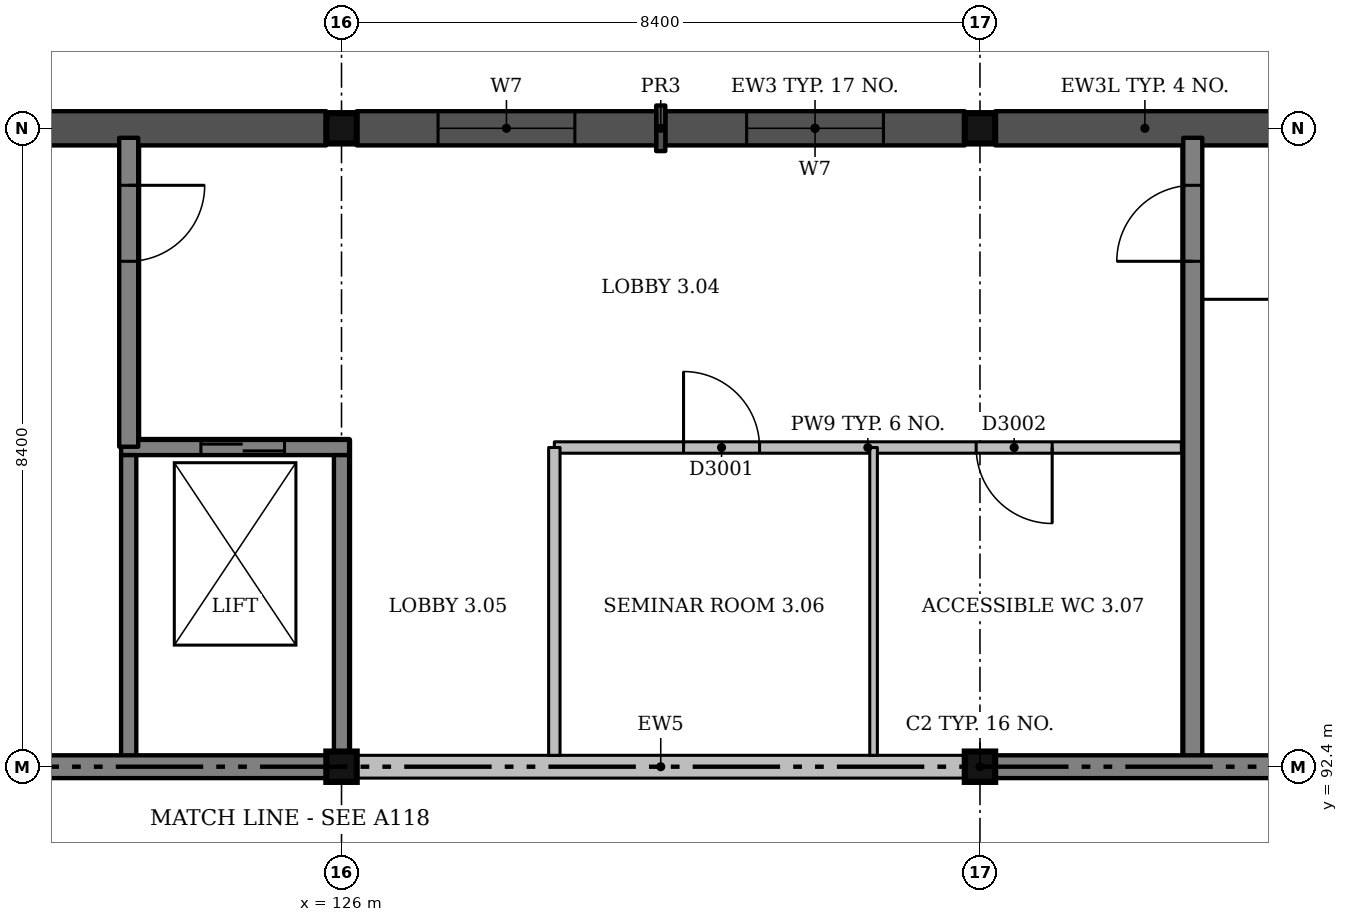
"""IFC4 building model, lengths in metres.
Left out: names, types, materials, properties, quantities, classifications, styles, units other than length and angle.
Written with IfcOpenShell. Run it as: python <this file> out.ifc"""

import sys

from ifc_helpers import new_model, si_unit, direction, frame, frame_2d, origin, origin_2d, place, context, subcontext, project, spatial, rectangle, extrude, element, fill, save


model = new_model("IFC4")
c1 = context("Model", 3, precision=1e-05, world=origin(), true_north=direction((0.0, 1.0)))
c2 = subcontext(c1, "Body", "Model", "MODEL_VIEW")
j1 = project(units=[si_unit("LENGTHUNIT", "METRE"), si_unit("PLANEANGLEUNIT", "RADIAN")], contexts=[c1])
p1 = place(None, origin())
s1 = spatial("IfcSite", under=j1, at=p1, CompositionType="ELEMENT")
p2 = place(p1, origin())
s2 = spatial("IfcBuilding", under=s1, at=p2, CompositionType="ELEMENT")
p3 = place(p2, frame((0.0, 0.0, 13.5)))
s3 = spatial("IfcBuildingStorey", under=s2, at=p3, CompositionType="ELEMENT", Elevation=13.5)
for number, where, z_axis, x_axis in (
    (1, (126.0, 92.4, 0.0), (0.0, 0.0, 1.0), (1.0, 0.0, 0.0)),
    (2, (126.0, 100.8, 0.0), (0.0, 0.0, 1.0), (1.0, 0.0, 0.0)),
    (3, (134.4, 92.4, 0.0), (0.0, 0.0, 1.0), (1.0, 0.0, 0.0)),
    (4, (134.4, 100.8, 0.0), (0.0, 0.0, 1.0), (1.0, 0.0, 0.0)),
):
    element("IfcColumn", number, at=place(p3, frame(where, z_axis=z_axis, x_axis=x_axis)), inside=s3, PredefinedType="COLUMN", context=c2, shape_type="SweptSolid", body=[
        extrude(rectangle(XDim=0.4, YDim=0.4, at=origin_2d()), origin(), (0.0, 0.0, 1.0), 4.5),
    ])
p4 = place(p3, frame((123.1, 96.6, 0.0), z_axis=(0.0, 0.0, 1.0), x_axis=(1.0, 0.0, 0.0)))
e5 = element("IfcWall", 5, at=p4, inside=s3, PredefinedType="SHEAR", context=c2, shape_type="SweptSolid", body=[
    extrude(rectangle(XDim=3.0, YDim=0.2, at=frame_2d((1.5, 0.0))), origin(), (0.0, 0.0, 1.0), 4.5),
])
p5 = place(p4, frame((1.05, 0.0, 0.0)))
e6 = element("IfcOpeningElement", 6, at=p5, cuts=e5, PredefinedType="OPENING", context=c2, shape_type="SweptSolid", body=[
    extrude(rectangle(XDim=1.1, YDim=2.1, at=frame_2d((0.55, 1.05))), frame((0.0, 0.11, 0.0), z_axis=(0.0, -1.0, 0.0), x_axis=(1.0, 0.0, 0.0)), (0.0, 0.0, 1.0), 0.22),
])
p6 = place(p3, frame((123.2, 92.5, 0.0), z_axis=(0.0, 0.0, 1.0), x_axis=(0.0, 1.0, 0.0)))
e7 = element("IfcWall", 7, at=p6, inside=s3, PredefinedType="SHEAR", context=c2, shape_type="SweptSolid", body=[
    extrude(rectangle(XDim=4.0, YDim=0.2, at=frame_2d((2.0, 0.0))), origin(), (0.0, 0.0, 1.0), 4.5),
])
p7 = place(p3, frame((126.0, 92.6, 0.0), z_axis=(0.0, 0.0, 1.0), x_axis=(0.0, 1.0, 0.0)))
e8 = element("IfcWall", 8, at=p7, inside=s3, PredefinedType="SHEAR", context=c2, shape_type="SweptSolid", body=[
    extrude(rectangle(XDim=3.9, YDim=0.2, at=frame_2d((1.95, 0.0))), origin(), (0.0, 0.0, 1.0), 4.5),
])
p8 = place(p3, frame((123.2, 96.61, 0.0), z_axis=(0.0, 0.0, 1.0), x_axis=(0.0, 1.0, 0.0)))
e9 = element("IfcWall", 9, at=p8, inside=s3, PredefinedType="SHEAR", context=c2, shape_type="SweptSolid", body=[
    extrude(rectangle(XDim=4.065, YDim=0.25, at=frame_2d((2.032, 0.0))), origin(), (0.0, 0.0, 1.0), 4.5),
])
p9 = place(p8, frame((2.44, 0.0, 0.0)))
e10 = element("IfcOpeningElement", 10, at=p9, cuts=e9, PredefinedType="OPENING", context=c2, shape_type="SweptSolid", body=[
    extrude(rectangle(XDim=1.0, YDim=2.1, at=frame_2d((0.5, 1.05))), frame((0.0, 0.135, 0.0), z_axis=(0.0, -1.0, 0.0), x_axis=(1.0, 0.0, 0.0)), (0.0, 0.0, 1.0), 0.27),
])
p10 = place(p3, frame((137.2, 92.525, 0.0), z_axis=(0.0, 0.0, 1.0), x_axis=(0.0, 1.0, 0.0)))
e11 = element("IfcWall", 11, at=p10, inside=s3, PredefinedType="SHEAR", context=c2, shape_type="SweptSolid", body=[
    extrude(rectangle(XDim=8.15, YDim=0.25, at=frame_2d((4.075, 0.0))), origin(), (0.0, 0.0, 1.0), 4.5),
])
p11 = place(p10, frame((6.525, 0.0, 0.0)))
e12 = element("IfcOpeningElement", 12, at=p11, cuts=e11, PredefinedType="OPENING", context=c2, shape_type="SweptSolid", body=[
    extrude(rectangle(XDim=1.0, YDim=2.1, at=frame_2d((0.5, 1.05))), frame((0.0, 0.135, 0.0), z_axis=(0.0, -1.0, 0.0), x_axis=(1.0, 0.0, 0.0)), (0.0, 0.0, 1.0), 0.27),
])
p12 = place(p3, frame((138.54, 100.8, 0.0), z_axis=(0.0, 0.0, 1.0), x_axis=(-1.0, 0.0, 0.0)))
e13 = element("IfcWall", 13, at=p12, inside=s3, PredefinedType="SOLIDWALL", context=c2, shape_type="SweptSolid", body=[
    extrude(rectangle(XDim=3.94, YDim=0.45, at=frame_2d((1.97, 0.0))), origin(), (0.0, 0.0, 1.0), 4.5),
])
p13 = place(p3, frame((134.2, 100.8, 0.0), z_axis=(0.0, 0.0, 1.0), x_axis=(-1.0, 0.0, 0.0)))
e14 = element("IfcWall", 14, at=p13, inside=s3, PredefinedType="SOLIDWALL", context=c2, shape_type="SweptSolid", body=[
    extrude(rectangle(XDim=3.94, YDim=0.45, at=frame_2d((1.97, 0.0))), origin(), (0.0, 0.0, 1.0), 4.5),
])
p14 = place(p13, frame((1.07, 0.0, 0.9)))
e15 = element("IfcOpeningElement", 15, at=p14, cuts=e14, PredefinedType="OPENING", context=c2, shape_type="SweptSolid", body=[
    extrude(rectangle(XDim=1.8, YDim=1.5, at=frame_2d((0.9, 0.75))), frame((0.0, 0.235, 0.0), z_axis=(0.0, -1.0, 0.0), x_axis=(1.0, 0.0, 0.0)), (0.0, 0.0, 1.0), 0.47),
])
p15 = place(p3, frame((130.26, 100.8, 0.0), z_axis=(0.0, 0.0, 1.0), x_axis=(-1.0, 0.0, 0.0)))
e16 = element("IfcWall", 16, at=p15, inside=s3, PredefinedType="SOLIDWALL", context=c2, shape_type="SweptSolid", body=[
    extrude(rectangle(XDim=0.12, YDim=0.6, at=frame_2d((0.06, 0.0))), origin(), (0.0, 0.0, 1.0), 4.5),
])
p16 = place(p3, frame((130.14, 100.8, 0.0), z_axis=(0.0, 0.0, 1.0), x_axis=(-1.0, 0.0, 0.0)))
e17 = element("IfcWall", 17, at=p16, inside=s3, PredefinedType="SOLIDWALL", context=c2, shape_type="SweptSolid", body=[
    extrude(rectangle(XDim=3.94, YDim=0.45, at=frame_2d((1.97, 0.0))), origin(), (0.0, 0.0, 1.0), 4.5),
])
p17 = place(p16, frame((1.07, 0.0, 0.9)))
e18 = element("IfcOpeningElement", 18, at=p17, cuts=e17, PredefinedType="OPENING", context=c2, shape_type="SweptSolid", body=[
    extrude(rectangle(XDim=1.8, YDim=1.5, at=frame_2d((0.9, 0.75))), frame((0.0, 0.235, 0.0), z_axis=(0.0, -1.0, 0.0), x_axis=(1.0, 0.0, 0.0)), (0.0, 0.0, 1.0), 0.47),
])
p18 = place(p3, frame((125.8, 100.8, 0.0), z_axis=(0.0, 0.0, 1.0), x_axis=(-1.0, 0.0, 0.0)))
e19 = element("IfcWall", 19, at=p18, inside=s3, PredefinedType="SOLIDWALL", context=c2, shape_type="SweptSolid", body=[
    extrude(rectangle(XDim=3.94, YDim=0.45, at=frame_2d((1.97, 0.0))), origin(), (0.0, 0.0, 1.0), 4.5),
])
for number, where, z_axis, x_axis in (
    (20, (117.8, 92.4, 0.0), (0.0, 0.0, 1.0), (1.0, 0.0, 0.0)),
    (21, (126.2, 92.4, 0.0), (0.0, 0.0, 1.0), (1.0, 0.0, 0.0)),
    (22, (134.6, 92.4, 0.0), (0.0, 0.0, 1.0), (1.0, 0.0, 0.0)),
):
    element("IfcWall", number, at=place(p3, frame(where, z_axis=z_axis, x_axis=x_axis)), inside=s3, PredefinedType="SOLIDWALL", context=c2, shape_type="SweptSolid", body=[
        extrude(rectangle(XDim=8.0, YDim=0.3, at=frame_2d((4.0, 0.0))), origin(), (0.0, 0.0, 1.0), 4.5),
    ])
p19 = place(p3, frame((128.8, 96.6, 0.0), z_axis=(0.0, 0.0, 1.0), x_axis=(1.0, 0.0, 0.0)))
e23 = element("IfcWall", 23, at=p19, inside=s3, PredefinedType="PARTITIONING", context=c2, shape_type="SweptSolid", body=[
    extrude(rectangle(XDim=8.25, YDim=0.15, at=frame_2d((4.125, 0.0))), origin(), (0.0, 0.0, 1.0), 4.15),
])
p20 = place(p19, frame((1.7, 0.0, 0.0)))
e24 = element("IfcOpeningElement", 24, at=p20, cuts=e23, PredefinedType="OPENING", context=c2, shape_type="SweptSolid", body=[
    extrude(rectangle(XDim=1.0, YDim=2.1, at=frame_2d((0.5, 1.05))), frame((0.0, 0.085, 0.0), z_axis=(0.0, -1.0, 0.0), x_axis=(1.0, 0.0, 0.0)), (0.0, 0.0, 1.0), 0.17),
])
p21 = place(p19, frame((5.55, 0.0, 0.0)))
e25 = element("IfcOpeningElement", 25, at=p21, cuts=e23, PredefinedType="OPENING", context=c2, shape_type="SweptSolid", body=[
    extrude(rectangle(XDim=1.0, YDim=2.1, at=frame_2d((0.5, 1.05))), frame((0.0, 0.085, 0.0), z_axis=(0.0, -1.0, 0.0), x_axis=(1.0, 0.0, 0.0)), (0.0, 0.0, 1.0), 0.17),
])
p22 = place(p3, frame((128.8, 92.55, 0.0), z_axis=(0.0, 0.0, 1.0), x_axis=(0.0, 1.0, 0.0)))
e26 = element("IfcWall", 26, at=p22, inside=s3, PredefinedType="PARTITIONING", context=c2, shape_type="SweptSolid", body=[
    extrude(rectangle(XDim=4.05, YDim=0.15, at=frame_2d((2.025, 0.0))), origin(), (0.0, 0.0, 1.0), 4.15),
])
p23 = place(p3, frame((133.0, 92.55, 0.0), z_axis=(0.0, 0.0, 1.0), x_axis=(0.0, 1.0, 0.0)))
e27 = element("IfcWall", 27, at=p23, inside=s3, PredefinedType="PARTITIONING", context=c2, shape_type="SweptSolid", body=[
    extrude(rectangle(XDim=4.05, YDim=0.1, at=frame_2d((2.025, 0.0))), origin(), (0.0, 0.0, 1.0), 4.15),
])
p24 = place(p14, origin())
e28 = element("IfcWindow", 28, at=p24, inside=s3, PartitioningType="SINGLE_PANEL", PredefinedType="WINDOW", context=c2, shape_type="SweptSolid", body=[
    extrude(rectangle(XDim=1.8, YDim=1.5, at=frame_2d((0.9, 0.75))), frame((0.0, 0.135, 0.0), z_axis=(0.0, -1.0, 0.0), x_axis=(1.0, 0.0, 0.0)), (0.0, 0.0, 1.0), 0.06),
])
fill(e15, e28)
p25 = place(p17, origin())
e29 = element("IfcWindow", 29, at=p25, inside=s3, PartitioningType="SINGLE_PANEL", PredefinedType="WINDOW", context=c2, shape_type="SweptSolid", body=[
    extrude(rectangle(XDim=1.8, YDim=1.5, at=frame_2d((0.9, 0.75))), frame((0.0, 0.135, 0.0), z_axis=(0.0, -1.0, 0.0), x_axis=(1.0, 0.0, 0.0)), (0.0, 0.0, 1.0), 0.06),
])
fill(e18, e29)
p26 = place(p20, origin())
e30 = element("IfcDoor", 30, at=p26, inside=s3, OperationType="SINGLE_SWING_LEFT", PredefinedType="DOOR", context=c2, shape_type="SweptSolid", body=[
    extrude(rectangle(XDim=1.0, YDim=2.1, at=frame_2d((0.5, 1.05))), frame((0.0, 0.025, 0.0), z_axis=(0.0, -1.0, 0.0), x_axis=(1.0, 0.0, 0.0)), (0.0, 0.0, 1.0), 0.05),
])
fill(e24, e30)
p27 = place(p21, origin())
e31 = element("IfcDoor", 31, at=p27, inside=s3, OperationType="SINGLE_SWING_RIGHT", PredefinedType="DOOR", context=c2, shape_type="SweptSolid", body=[
    extrude(rectangle(XDim=1.0, YDim=2.1, at=frame_2d((0.5, 1.05))), frame((0.0, 0.025, 0.0), z_axis=(0.0, -1.0, 0.0), x_axis=(1.0, 0.0, 0.0)), (0.0, 0.0, 1.0), 0.05),
])
fill(e25, e31)
p28 = place(p9, origin())
e32 = element("IfcDoor", 32, at=p28, inside=s3, OperationType="SINGLE_SWING_RIGHT", PredefinedType="DOOR", context=c2, shape_type="SweptSolid", body=[
    extrude(rectangle(XDim=1.0, YDim=2.1, at=frame_2d((0.5, 1.05))), frame((0.0, 0.025, 0.0), z_axis=(0.0, -1.0, 0.0), x_axis=(1.0, 0.0, 0.0)), (0.0, 0.0, 1.0), 0.05),
])
fill(e10, e32)
p29 = place(p11, origin())
e33 = element("IfcDoor", 33, at=p29, inside=s3, OperationType="SINGLE_SWING_LEFT", PredefinedType="DOOR", context=c2, shape_type="SweptSolid", body=[
    extrude(rectangle(XDim=1.0, YDim=2.1, at=frame_2d((0.5, 1.05))), frame((0.0, 0.025, 0.0), z_axis=(0.0, -1.0, 0.0), x_axis=(1.0, 0.0, 0.0)), (0.0, 0.0, 1.0), 0.05),
])
fill(e12, e33)
p30 = place(p5, origin())
e34 = element("IfcDoor", 34, at=p30, inside=s3, OperationType="SLIDING_TO_RIGHT", PredefinedType="DOOR", context=c2, shape_type="SweptSolid", body=[
    extrude(rectangle(XDim=1.1, YDim=2.1, at=frame_2d((0.55, 1.05))), frame((0.0, 0.025, 0.0), z_axis=(0.0, -1.0, 0.0), x_axis=(1.0, 0.0, 0.0)), (0.0, 0.0, 1.0), 0.05),
])
fill(e6, e34)
save(model, sys.argv[1])
